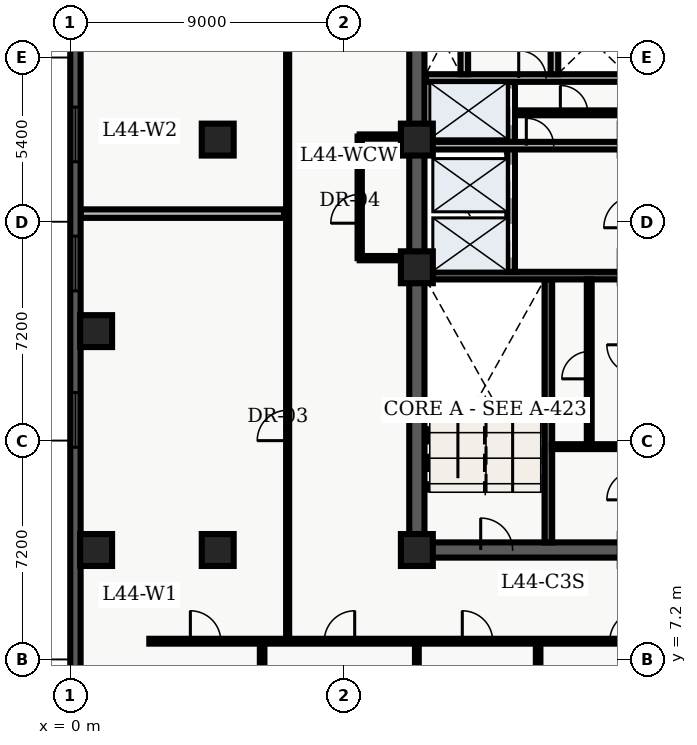
"""IFC4 building model, lengths in metres.
Left out: names, types, materials, properties, quantities, classifications, styles, units other than length and angle.
Written with IfcOpenShell. Run it as: python <this file> out.ifc"""

import sys

from ifc_helpers import new_model, entity, si_unit, converted_unit, direction, frame, origin_with_axes, origin_2d_with_axis, place, context, subcontext, project, spatial, polyline, rectangle, outline, extrude, element, fill, save


model = new_model("IFC4")
c1 = context("Model", 3, precision=1e-05, world=origin_with_axes(), true_north=direction((0.0, 1.0)))
c2 = subcontext(c1, "Body", "Model", "MODEL_VIEW")
j1 = project(units=[si_unit("LENGTHUNIT", "METRE"), converted_unit("PLANEANGLEUNIT", "DEGREE", entity("IfcPlaneAngleMeasure", 0.017), si_unit("PLANEANGLEUNIT", "RADIAN"), dimensions=[0, 0, 0, 0, 0, 0, 0])], contexts=[c1])
p1 = place(None, origin_with_axes())
s1 = spatial("IfcSite", under=j1, at=p1, CompositionType="ELEMENT")
p2 = place(p1, origin_with_axes())
s2 = spatial("IfcBuilding", under=s1, at=p2, CompositionType="ELEMENT")
p3 = place(p2, frame((0.0, 0.0, 179.7), z_axis=(0.0, 0.0, 1.0), x_axis=(1.0, 0.0, 0.0)))
s3 = spatial("IfcBuildingStorey", under=s2, at=p3, CompositionType="ELEMENT", Elevation=179.7)
p4 = place(p3, frame((11.4, 10.8, 0.0), z_axis=(0.0, 0.0, 1.0), x_axis=(0.0, 1.0, 0.0)))
e1 = element("IfcWall", 1, at=p4, inside=s3, PredefinedType="SHEAR", context=c2, shape_type="SweptSolid", body=[
    extrude(outline(polyline([(0.0, -0.25), (27.0, -0.25), (27.0, 0.25), (0.0, 0.25), (0.0, -0.25)])), origin_with_axes(), (0.0, 0.0, 1.0), 3.66),
])
p5 = place(p3, frame((11.4, 10.8, 0.0), z_axis=(0.0, 0.0, 1.0), x_axis=(1.0, 0.0, 0.0)))
e2 = element("IfcWall", 2, at=p5, inside=s3, PredefinedType="SHEAR", context=c2, shape_type="SweptSolid", body=[
    extrude(outline(polyline([(0.0, -0.25), (7.2, -0.25), (7.2, 0.25), (0.0, 0.25), (0.0, -0.25)])), origin_with_axes(), (0.0, 0.0, 1.0), 3.66),
])
p6 = place(p5, frame((2.625, 0.0, 0.0), z_axis=(0.0, 0.0, 1.0), x_axis=(1.0, 0.0, 0.0)))
e3 = element("IfcOpeningElement", 3, at=p6, cuts=e2, PredefinedType="OPENING", context=c2, shape_type="SweptSolid", body=[
    extrude(rectangle(XDim=1.05, YDim=0.52, at=origin_2d_with_axis()), origin_with_axes(), (0.0, 0.0, 1.0), 2.15),
])
p7 = place(p3, frame((15.725, 11.05, 0.0), z_axis=(0.0, 0.0, 1.0), x_axis=(0.0, 1.0, 0.0)))
e4 = element("IfcWall", 4, at=p7, inside=s3, PredefinedType="SHEAR", context=c2, shape_type="SweptSolid", body=[
    extrude(outline(polyline([(0.0, -0.125), (8.65, -0.125), (8.65, 0.125), (0.0, 0.125), (0.0, -0.125)])), origin_with_axes(), (0.0, 0.0, 1.0), 3.66),
])
p8 = place(p3, frame((11.65, 19.825, 0.0), z_axis=(0.0, 0.0, 1.0), x_axis=(1.0, 0.0, 0.0)))
e5 = element("IfcWall", 5, at=p8, inside=s3, PredefinedType="SHEAR", context=c2, shape_type="SweptSolid", body=[
    extrude(outline(polyline([(0.0, -0.125), (6.7, -0.125), (6.7, 0.125), (0.0, 0.125), (0.0, -0.125)])), origin_with_axes(), (0.0, 0.0, 1.0), 3.66),
])
p9 = place(p3, frame((14.5, 19.95, 0.0), z_axis=(0.0, 0.0, 1.0), x_axis=(0.0, 1.0, 0.0)))
e6 = element("IfcWall", 6, at=p9, inside=s3, PredefinedType="SOLIDWALL", context=c2, shape_type="SweptSolid", body=[
    extrude(outline(polyline([(0.0, -0.125), (6.25, -0.125), (6.25, 0.125), (0.0, 0.125), (0.0, -0.125)])), origin_with_axes(), (0.0, 0.0, 1.0), 2.7),
])
p10 = place(p9, frame((1.025, 0.0, 0.0), z_axis=(0.0, 0.0, 1.0), x_axis=(1.0, 0.0, 0.0)))
e7 = element("IfcOpeningElement", 7, at=p10, cuts=e6, PredefinedType="OPENING", context=c2, shape_type="SweptSolid", body=[
    extrude(rectangle(XDim=1.1, YDim=0.27, at=origin_2d_with_axis()), origin_with_axes(), (0.0, 0.0, 1.0), 2.15),
])
p11 = place(p9, frame((2.975, 0.0, 0.0), z_axis=(0.0, 0.0, 1.0), x_axis=(1.0, 0.0, 0.0)))
e8 = element("IfcOpeningElement", 8, at=p11, cuts=e6, PredefinedType="OPENING", context=c2, shape_type="SweptSolid", body=[
    extrude(rectangle(XDim=1.1, YDim=0.27, at=origin_2d_with_axis()), origin_with_axes(), (0.0, 0.0, 1.0), 2.15),
])
p12 = place(p9, frame((5.425, 0.0, 0.0), z_axis=(0.0, 0.0, 1.0), x_axis=(1.0, 0.0, 0.0)))
e9 = element("IfcOpeningElement", 9, at=p12, cuts=e6, PredefinedType="OPENING", context=c2, shape_type="SweptSolid", body=[
    extrude(rectangle(XDim=1.2, YDim=0.27, at=origin_2d_with_axis()), origin_with_axes(), (0.0, 0.0, 1.0), 2.15),
])
p13 = place(p3, frame((11.7, 24.1, 0.0), z_axis=(0.0, 0.0, 1.0), x_axis=(1.0, 0.0, 0.0)))
e10 = element("IfcWall", 10, at=p13, inside=s3, PredefinedType="SOLIDWALL", context=c2, shape_type="SweptSolid", body=[
    extrude(outline(polyline([(0.0, -0.125), (6.6, -0.125), (6.6, 0.125), (0.0, 0.125), (0.0, -0.125)])), origin_with_axes(), (0.0, 0.0, 1.0), 2.7),
])
p14 = place(p13, frame((3.75, 0.0, 0.0), z_axis=(0.0, 0.0, 1.0), x_axis=(1.0, 0.0, 0.0)))
e11 = element("IfcOpeningElement", 11, at=p14, cuts=e10, PredefinedType="OPENING", context=c2, shape_type="SweptSolid", body=[
    extrude(rectangle(XDim=0.9, YDim=0.27, at=origin_2d_with_axis()), origin_with_axes(), (0.0, 0.0, 1.0), 2.15),
])
p15 = place(p3, frame((11.7, 26.325, 0.0), z_axis=(0.0, 0.0, 1.0), x_axis=(1.0, 0.0, 0.0)))
e12 = element("IfcWall", 12, at=p15, inside=s3, PredefinedType="SOLIDWALL", context=c2, shape_type="SweptSolid", body=[
    extrude(outline(polyline([(0.0, -0.125), (6.6, -0.125), (6.6, 0.125), (0.0, 0.125), (0.0, -0.125)])), origin_with_axes(), (0.0, 0.0, 1.0), 2.7),
])
p16 = place(p15, frame((3.5, 0.0, 0.0), z_axis=(0.0, 0.0, 1.0), x_axis=(1.0, 0.0, 0.0)))
e13 = element("IfcOpeningElement", 13, at=p16, cuts=e12, PredefinedType="OPENING", context=c2, shape_type="SweptSolid", body=[
    extrude(rectangle(XDim=0.9, YDim=0.27, at=origin_2d_with_axis()), origin_with_axes(), (0.0, 0.0, 1.0), 2.15),
])
for number, where, z_axis, x_axis in (
    (14, (12.96, 26.45, 0.0), (0.0, 0.0, 1.0), (0.0, 1.0, 0.0)),
    (15, (15.925, 26.45, 0.0), (0.0, 0.0, 1.0), (0.0, 1.0, 0.0)),
):
    element("IfcWall", number, at=place(p3, frame(where, z_axis=z_axis, x_axis=x_axis)), inside=s3, PredefinedType="SOLIDWALL", context=c2, shape_type="SweptSolid", body=[
        extrude(outline(polyline([(0.0, -0.125), (2.2, -0.125), (2.2, 0.125), (0.0, 0.125), (0.0, -0.125)])), origin_with_axes(), (0.0, 0.0, 1.0), 2.7),
    ])
for number, where, z_axis, x_axis in (
    (16, (11.4, 10.8, 0.0), (0.0, 0.0, 1.0), (1.0, 0.0, 0.0)),
    (17, (11.4, 20.1, 0.0), (0.0, 0.0, 1.0), (1.0, 0.0, 0.0)),
    (18, (11.4, 24.3, 0.0), (0.0, 0.0, 1.0), (1.0, 0.0, 0.0)),
    (19, (4.85, 10.8, 0.0), (0.0, 0.0, 1.0), (1.0, 0.0, 0.0)),
    (20, (4.85, 24.3, 0.0), (0.0, 0.0, 1.0), (1.0, 0.0, 0.0)),
    (21, (0.85, 10.8, 0.0), (0.0, 0.0, 1.0), (1.0, 0.0, 0.0)),
    (22, (0.85, 18.0, 0.0), (0.0, 0.0, 1.0), (1.0, 0.0, 0.0)),
):
    element("IfcColumn", number, at=place(p3, frame(where, z_axis=z_axis, x_axis=x_axis)), inside=s3, PredefinedType="COLUMN", context=c2, shape_type="SweptSolid", body=[
        extrude(rectangle(XDim=1.05, YDim=1.05, at=origin_2d_with_axis()), origin_with_axes(), (0.0, 0.0, 1.0), 3.9),
    ])
p17 = place(p3, frame((14.62, 25.18, 0.0), z_axis=(0.0, 0.0, 1.0), x_axis=(1.0, 0.0, 0.0)))
e23 = element("IfcWall", 23, at=p17, inside=s3, PredefinedType="PARTITIONING", context=c2, shape_type="SweptSolid", body=[
    extrude(outline(polyline([(0.0, -0.08), (3.68, -0.08), (3.68, 0.08), (0.0, 0.08), (0.0, -0.08)])), origin_with_axes(), (0.0, 0.0, 1.0), 2.7),
])
p18 = place(p17, frame((1.95, 0.0, 0.0), z_axis=(0.0, 0.0, 1.0), x_axis=(1.0, 0.0, 0.0)))
e24 = element("IfcOpeningElement", 24, at=p18, cuts=e23, PredefinedType="OPENING", context=c2, shape_type="SweptSolid", body=[
    extrude(rectangle(XDim=0.9, YDim=0.18, at=origin_2d_with_axis()), origin_with_axes(), (0.0, 0.0, 1.0), 2.15),
])
p19 = place(p3, frame((15.84, 14.2, 0.0), z_axis=(0.0, 0.0, 1.0), x_axis=(1.0, 0.0, 0.0)))
e25 = element("IfcWall", 25, at=p19, inside=s3, PredefinedType="PARTITIONING", context=c2, shape_type="SweptSolid", body=[
    extrude(outline(polyline([(0.0, -0.08), (2.46, -0.08), (2.46, 0.08), (0.0, 0.08), (0.0, -0.08)])), origin_with_axes(), (0.0, 0.0, 1.0), 2.7),
])
p20 = place(p3, frame((17.07, 14.28, 0.0), z_axis=(0.0, 0.0, 1.0), x_axis=(0.0, 1.0, 0.0)))
e26 = element("IfcWall", 26, at=p20, inside=s3, PredefinedType="PARTITIONING", context=c2, shape_type="SweptSolid", body=[
    extrude(outline(polyline([(0.0, -0.08), (5.42, -0.08), (5.42, 0.08), (0.0, 0.08), (0.0, -0.08)])), origin_with_axes(), (0.0, 0.0, 1.0), 2.7),
])
p21 = place(p20, frame((2.6, 0.0, 0.0), z_axis=(0.0, 0.0, 1.0), x_axis=(1.0, 0.0, 0.0)))
e27 = element("IfcOpeningElement", 27, at=p21, cuts=e26, PredefinedType="OPENING", context=c2, shape_type="SweptSolid", body=[
    extrude(rectangle(XDim=0.9, YDim=0.18, at=origin_2d_with_axis()), origin_with_axes(), (0.0, 0.0, 1.0), 2.15),
])
p22 = place(p3, frame((9.52, 20.4, 0.0), z_axis=(0.0, 0.0, 1.0), x_axis=(0.0, 1.0, 0.0)))
e28 = element("IfcWall", 28, at=p22, inside=s3, PredefinedType="PARTITIONING", context=c2, shape_type="SweptSolid", body=[
    extrude(outline(polyline([(0.0, -0.07), (4.0, -0.07), (4.0, 0.07), (0.0, 0.07), (0.0, -0.07)])), origin_with_axes(), (0.0, 0.0, 1.0), 2.7),
])
p23 = place(p22, frame((1.625, 0.0, 0.0), z_axis=(0.0, 0.0, 1.0), x_axis=(1.0, 0.0, 0.0)))
e29 = element("IfcOpeningElement", 29, at=p23, cuts=e28, PredefinedType="OPENING", context=c2, shape_type="SweptSolid", body=[
    extrude(rectangle(XDim=0.95, YDim=0.16, at=origin_2d_with_axis()), origin_with_axes(), (0.0, 0.0, 1.0), 2.15),
])
for number, where, z_axis, x_axis in (
    (30, (9.52, 20.4, 0.0), (0.0, 0.0, 1.0), (1.0, 0.0, 0.0)),
    (31, (9.52, 24.4, 0.0), (0.0, 0.0, 1.0), (1.0, 0.0, 0.0)),
):
    element("IfcWall", number, at=place(p3, frame(where, z_axis=z_axis, x_axis=x_axis)), inside=s3, PredefinedType="PARTITIONING", context=c2, shape_type="SweptSolid", body=[
        extrude(outline(polyline([(0.0, -0.07), (1.58, -0.07), (1.58, 0.07), (0.0, 0.07), (0.0, -0.07)])), origin_with_axes(), (0.0, 0.0, 1.0), 2.7),
    ])
p24 = place(p3, frame((2.6, 7.8, 0.0), z_axis=(0.0, 0.0, 1.0), x_axis=(1.0, 0.0, 0.0)))
e32 = element("IfcWall", 32, at=p24, inside=s3, PredefinedType="PARTITIONING", context=c2, shape_type="SweptSolid", body=[
    extrude(outline(polyline([(0.0, -0.08), (18.55, -0.08), (18.55, 0.08), (0.0, 0.08), (0.0, -0.08)])), origin_with_axes(), (0.0, 0.0, 1.0), 2.7),
])
p25 = place(p24, frame((1.851, 0.0, 0.0), z_axis=(0.0, 0.0, 1.0), x_axis=(1.0, 0.0, 0.0)))
e33 = element("IfcOpeningElement", 33, at=p25, cuts=e32, PredefinedType="OPENING", context=c2, shape_type="SweptSolid", body=[
    extrude(rectangle(XDim=1.0, YDim=0.18, at=origin_2d_with_axis()), origin_with_axes(), (0.0, 0.0, 1.0), 2.15),
])
p26 = place(p24, frame((6.255, 0.0, 0.0), z_axis=(0.0, 0.0, 1.0), x_axis=(1.0, 0.0, 0.0)))
e34 = element("IfcOpeningElement", 34, at=p26, cuts=e32, PredefinedType="OPENING", context=c2, shape_type="SweptSolid", body=[
    extrude(rectangle(XDim=1.0, YDim=0.18, at=origin_2d_with_axis()), origin_with_axes(), (0.0, 0.0, 1.0), 2.15),
])
p27 = place(p24, frame((10.794, 0.0, 0.0), z_axis=(0.0, 0.0, 1.0), x_axis=(1.0, 0.0, 0.0)))
e35 = element("IfcOpeningElement", 35, at=p27, cuts=e32, PredefinedType="OPENING", context=c2, shape_type="SweptSolid", body=[
    extrude(rectangle(XDim=1.0, YDim=0.18, at=origin_2d_with_axis()), origin_with_axes(), (0.0, 0.0, 1.0), 2.15),
])
p28 = place(p24, frame((15.645, 0.0, 0.0), z_axis=(0.0, 0.0, 1.0), x_axis=(1.0, 0.0, 0.0)))
e36 = element("IfcOpeningElement", 36, at=p28, cuts=e32, PredefinedType="OPENING", context=c2, shape_type="SweptSolid", body=[
    extrude(rectangle(XDim=1.0, YDim=0.18, at=origin_2d_with_axis()), origin_with_axes(), (0.0, 0.0, 1.0), 2.15),
])
p29 = place(p3, frame((7.15, 7.8, 0.0), z_axis=(0.0, 0.0, 1.0), x_axis=(0.0, 1.0, 0.0)))
e37 = element("IfcWall", 37, at=p29, inside=s3, PredefinedType="PARTITIONING", context=c2, shape_type="SweptSolid", body=[
    extrude(outline(polyline([(0.0, -0.05), (32.7, -0.05), (32.7, 0.05), (0.0, 0.05), (0.0, -0.05)])), origin_with_axes(), (0.0, 0.0, 1.0), 2.7),
])
p30 = place(p29, frame((7.098, 0.0, 0.0), z_axis=(0.0, 0.0, 1.0), x_axis=(1.0, 0.0, 0.0)))
e38 = element("IfcOpeningElement", 38, at=p30, cuts=e37, PredefinedType="OPENING", context=c2, shape_type="SweptSolid", body=[
    extrude(rectangle(XDim=1.0, YDim=0.12, at=origin_2d_with_axis()), origin_with_axes(), (0.0, 0.0, 1.0), 2.15),
])
p31 = place(p29, frame((23.317, 0.0, 0.0), z_axis=(0.0, 0.0, 1.0), x_axis=(1.0, 0.0, 0.0)))
e39 = element("IfcOpeningElement", 39, at=p31, cuts=e37, PredefinedType="OPENING", context=c2, shape_type="SweptSolid", body=[
    extrude(rectangle(XDim=1.0, YDim=0.12, at=origin_2d_with_axis()), origin_with_axes(), (0.0, 0.0, 1.0), 2.15),
])
p32 = place(p3, frame((0.335, 21.865, 0.0), z_axis=(0.0, 0.0, 1.0), x_axis=(1.0, 0.0, 0.0)))
e40 = element("IfcWall", 40, at=p32, inside=s3, PredefinedType="PARTITIONING", context=c2, shape_type="SweptSolid", body=[
    extrude(outline(polyline([(0.0, -0.14), (6.695, -0.14), (6.695, 0.14), (0.0, 0.14), (0.0, -0.14)])), origin_with_axes(), (0.0, 0.0, 1.0), 2.7),
])
p33 = place(p3, frame((6.311, 0.335, 0.0), z_axis=(0.0, 0.0, 1.0), x_axis=(0.0, 1.0, 0.0)))
e41 = element("IfcWall", 41, at=p33, inside=s3, PredefinedType="PARTITIONING", context=c2, shape_type="SweptSolid", body=[
    extrude(outline(polyline([(0.0, -0.075), (7.365, -0.075), (7.365, 0.075), (0.0, 0.075), (0.0, -0.075)])), origin_with_axes(), (0.0, 0.0, 1.0), 2.7),
])
p34 = place(p3, frame((11.4, 0.335, 0.0), z_axis=(0.0, 0.0, 1.0), x_axis=(0.0, 1.0, 0.0)))
e42 = element("IfcWall", 42, at=p34, inside=s3, PredefinedType="PARTITIONING", context=c2, shape_type="SweptSolid", body=[
    extrude(outline(polyline([(0.0, -0.062), (7.365, -0.062), (7.365, 0.062), (0.0, 0.062), (0.0, -0.062)])), origin_with_axes(), (0.0, 0.0, 1.0), 2.7),
])
p35 = place(p3, frame((15.389, 0.335, 0.0), z_axis=(0.0, 0.0, 1.0), x_axis=(0.0, 1.0, 0.0)))
e43 = element("IfcWall", 43, at=p35, inside=s3, PredefinedType="PARTITIONING", context=c2, shape_type="SweptSolid", body=[
    extrude(outline(polyline([(0.0, -0.075), (7.365, -0.075), (7.365, 0.075), (0.0, 0.075), (0.0, -0.075)])), origin_with_axes(), (0.0, 0.0, 1.0), 2.7),
])
p36 = place(p3, frame((0.17, 2.74, 0.0), z_axis=(0.0, 0.0, 1.0), x_axis=(0.0, 1.0, 0.0)))
e44 = element("IfcWall", 44, at=p36, inside=s3, PredefinedType="SOLIDWALL", context=c2, shape_type="SweptSolid", body=[
    extrude(outline(polyline([(0.0, -0.17), (43.46, -0.17), (43.46, 0.17), (0.0, 0.17), (0.0, -0.17)])), origin_with_axes(), (0.0, 0.0, 1.0), 3.66),
])
p37 = place(p36, frame((2.948, 0.0, 0.45), z_axis=(0.0, 0.0, 1.0), x_axis=(1.0, 0.0, 0.0)))
e45 = element("IfcOpeningElement", 45, at=p37, cuts=e44, PredefinedType="OPENING", context=c2, shape_type="SweptSolid", body=[
    extrude(rectangle(XDim=1.8, YDim=0.36, at=origin_2d_with_axis()), origin_with_axes(), (0.0, 0.0, 1.0), 2.1),
])
p38 = place(p36, frame((12.339, 0.0, 0.45), z_axis=(0.0, 0.0, 1.0), x_axis=(1.0, 0.0, 0.0)))
e46 = element("IfcOpeningElement", 46, at=p38, cuts=e44, PredefinedType="OPENING", context=c2, shape_type="SweptSolid", body=[
    extrude(rectangle(XDim=1.8, YDim=0.36, at=origin_2d_with_axis()), origin_with_axes(), (0.0, 0.0, 1.0), 2.1),
])
p39 = place(p36, frame((17.484, 0.0, 0.45), z_axis=(0.0, 0.0, 1.0), x_axis=(1.0, 0.0, 0.0)))
e47 = element("IfcOpeningElement", 47, at=p39, cuts=e44, PredefinedType="OPENING", context=c2, shape_type="SweptSolid", body=[
    extrude(rectangle(XDim=1.8, YDim=0.36, at=origin_2d_with_axis()), origin_with_axes(), (0.0, 0.0, 1.0), 2.1),
])
p40 = place(p36, frame((21.73, 0.0, 0.45), z_axis=(0.0, 0.0, 1.0), x_axis=(1.0, 0.0, 0.0)))
e48 = element("IfcOpeningElement", 48, at=p40, cuts=e44, PredefinedType="OPENING", context=c2, shape_type="SweptSolid", body=[
    extrude(rectangle(XDim=1.8, YDim=0.36, at=origin_2d_with_axis()), origin_with_axes(), (0.0, 0.0, 1.0), 2.1),
])
p41 = place(p36, frame((26.426, 0.0, 0.45), z_axis=(0.0, 0.0, 1.0), x_axis=(1.0, 0.0, 0.0)))
e49 = element("IfcOpeningElement", 49, at=p41, cuts=e44, PredefinedType="OPENING", context=c2, shape_type="SweptSolid", body=[
    extrude(rectangle(XDim=1.8, YDim=0.36, at=origin_2d_with_axis()), origin_with_axes(), (0.0, 0.0, 1.0), 2.1),
])
p42 = place(p36, frame((31.121, 0.0, 0.45), z_axis=(0.0, 0.0, 1.0), x_axis=(1.0, 0.0, 0.0)))
e50 = element("IfcOpeningElement", 50, at=p42, cuts=e44, PredefinedType="OPENING", context=c2, shape_type="SweptSolid", body=[
    extrude(rectangle(XDim=1.8, YDim=0.36, at=origin_2d_with_axis()), origin_with_axes(), (0.0, 0.0, 1.0), 2.1),
])
p43 = place(p36, frame((40.062, 0.0, 0.45), z_axis=(0.0, 0.0, 1.0), x_axis=(1.0, 0.0, 0.0)))
e51 = element("IfcOpeningElement", 51, at=p43, cuts=e44, PredefinedType="OPENING", context=c2, shape_type="SweptSolid", body=[
    extrude(rectangle(XDim=1.8, YDim=0.36, at=origin_2d_with_axis()), origin_with_axes(), (0.0, 0.0, 1.0), 2.1),
])
p44 = place(p9, frame((1.025, 0.0, 0.0), z_axis=(0.0, 0.0, 1.0), x_axis=(1.0, 0.0, 0.0)))
e52 = element("IfcDoor", 52, at=p44, inside=s3, OperationType="SLIDING_TO_LEFT", PredefinedType="DOOR", context=c2, shape_type="SweptSolid", body=[
    extrude(rectangle(XDim=1.1, YDim=0.09, at=origin_2d_with_axis()), origin_with_axes(), (0.0, 0.0, 1.0), 2.15),
])
fill(e7, e52)
p45 = place(p9, frame((2.975, 0.0, 0.0), z_axis=(0.0, 0.0, 1.0), x_axis=(1.0, 0.0, 0.0)))
e53 = element("IfcDoor", 53, at=p45, inside=s3, OperationType="SLIDING_TO_RIGHT", PredefinedType="DOOR", context=c2, shape_type="SweptSolid", body=[
    extrude(rectangle(XDim=1.1, YDim=0.09, at=origin_2d_with_axis()), origin_with_axes(), (0.0, 0.0, 1.0), 2.15),
])
fill(e8, e53)
p46 = place(p9, frame((5.425, 0.0, 0.0), z_axis=(0.0, 0.0, 1.0), x_axis=(1.0, 0.0, 0.0)))
e54 = element("IfcDoor", 54, at=p46, inside=s3, OperationType="DOUBLE_DOOR_SLIDING", PredefinedType="DOOR", context=c2, shape_type="SweptSolid", body=[
    extrude(rectangle(XDim=1.2, YDim=0.09, at=origin_2d_with_axis()), origin_with_axes(), (0.0, 0.0, 1.0), 2.15),
])
fill(e9, e54)
p47 = place(p5, frame((2.625, 0.0, 0.0), z_axis=(0.0, 0.0, 1.0), x_axis=(1.0, 0.0, 0.0)))
e55 = element("IfcDoor", 55, at=p47, inside=s3, OperationType="SINGLE_SWING_LEFT", PredefinedType="DOOR", context=c2, shape_type="SweptSolid", body=[
    extrude(rectangle(XDim=1.05, YDim=0.09, at=origin_2d_with_axis()), origin_with_axes(), (0.0, 0.0, 1.0), 2.15),
])
fill(e3, e55)
p48 = place(p15, frame((3.5, 0.0, 0.0), z_axis=(0.0, 0.0, 1.0), x_axis=(1.0, 0.0, 0.0)))
e56 = element("IfcDoor", 56, at=p48, inside=s3, OperationType="SINGLE_SWING_LEFT", PredefinedType="DOOR", context=c2, shape_type="SweptSolid", body=[
    extrude(rectangle(XDim=0.9, YDim=0.09, at=origin_2d_with_axis()), origin_with_axes(), (0.0, 0.0, 1.0), 2.15),
])
fill(e13, e56)
p49 = place(p13, frame((3.75, 0.0, 0.0), z_axis=(0.0, 0.0, 1.0), x_axis=(1.0, 0.0, 0.0)))
e57 = element("IfcDoor", 57, at=p49, inside=s3, OperationType="SINGLE_SWING_LEFT", PredefinedType="DOOR", context=c2, shape_type="SweptSolid", body=[
    extrude(rectangle(XDim=0.9, YDim=0.09, at=origin_2d_with_axis()), origin_with_axes(), (0.0, 0.0, 1.0), 2.15),
])
fill(e11, e57)
p50 = place(p17, frame((1.95, 0.0, 0.0), z_axis=(0.0, 0.0, 1.0), x_axis=(1.0, 0.0, 0.0)))
e58 = element("IfcDoor", 58, at=p50, inside=s3, OperationType="SINGLE_SWING_LEFT", PredefinedType="DOOR", context=c2, shape_type="SweptSolid", body=[
    extrude(rectangle(XDim=0.9, YDim=0.09, at=origin_2d_with_axis()), origin_with_axes(), (0.0, 0.0, 1.0), 2.15),
])
fill(e24, e58)
p51 = place(p20, frame((2.6, 0.0, 0.0), z_axis=(0.0, 0.0, 1.0), x_axis=(1.0, 0.0, 0.0)))
e59 = element("IfcDoor", 59, at=p51, inside=s3, OperationType="SINGLE_SWING_LEFT", PredefinedType="DOOR", context=c2, shape_type="SweptSolid", body=[
    extrude(rectangle(XDim=0.9, YDim=0.09, at=origin_2d_with_axis()), origin_with_axes(), (0.0, 0.0, 1.0), 2.15),
])
fill(e27, e59)
p52 = place(p22, frame((1.625, 0.0, 0.0), z_axis=(0.0, 0.0, 1.0), x_axis=(1.0, 0.0, 0.0)))
e60 = element("IfcDoor", 60, at=p52, inside=s3, OperationType="SINGLE_SWING_LEFT", PredefinedType="DOOR", context=c2, shape_type="SweptSolid", body=[
    extrude(rectangle(XDim=0.95, YDim=0.084, at=origin_2d_with_axis()), origin_with_axes(), (0.0, 0.0, 1.0), 2.15),
])
fill(e29, e60)
p53 = place(p29, frame((7.098, 0.0, 0.0), z_axis=(0.0, 0.0, 1.0), x_axis=(1.0, 0.0, 0.0)))
e61 = element("IfcDoor", 61, at=p53, inside=s3, OperationType="SINGLE_SWING_LEFT", PredefinedType="DOOR", context=c2, shape_type="SweptSolid", body=[
    extrude(rectangle(XDim=1.0, YDim=0.06, at=origin_2d_with_axis()), origin_with_axes(), (0.0, 0.0, 1.0), 2.15),
])
fill(e38, e61)
p54 = place(p24, frame((1.851, 0.0, 0.0), z_axis=(0.0, 0.0, 1.0), x_axis=(1.0, 0.0, 0.0)))
e62 = element("IfcDoor", 62, at=p54, inside=s3, OperationType="SINGLE_SWING_LEFT", PredefinedType="DOOR", context=c2, shape_type="SweptSolid", body=[
    extrude(rectangle(XDim=1.0, YDim=0.09, at=origin_2d_with_axis()), origin_with_axes(), (0.0, 0.0, 1.0), 2.15),
])
fill(e33, e62)
p55 = place(p24, frame((6.255, 0.0, 0.0), z_axis=(0.0, 0.0, 1.0), x_axis=(1.0, 0.0, 0.0)))
e63 = element("IfcDoor", 63, at=p55, inside=s3, OperationType="SINGLE_SWING_RIGHT", PredefinedType="DOOR", context=c2, shape_type="SweptSolid", body=[
    extrude(rectangle(XDim=1.0, YDim=0.09, at=origin_2d_with_axis()), origin_with_axes(), (0.0, 0.0, 1.0), 2.15),
])
fill(e34, e63)
p56 = place(p24, frame((10.794, 0.0, 0.0), z_axis=(0.0, 0.0, 1.0), x_axis=(1.0, 0.0, 0.0)))
e64 = element("IfcDoor", 64, at=p56, inside=s3, OperationType="SINGLE_SWING_LEFT", PredefinedType="DOOR", context=c2, shape_type="SweptSolid", body=[
    extrude(rectangle(XDim=1.0, YDim=0.09, at=origin_2d_with_axis()), origin_with_axes(), (0.0, 0.0, 1.0), 2.15),
])
fill(e35, e64)
p57 = place(p24, frame((15.645, 0.0, 0.0), z_axis=(0.0, 0.0, 1.0), x_axis=(1.0, 0.0, 0.0)))
e65 = element("IfcDoor", 65, at=p57, inside=s3, OperationType="SINGLE_SWING_RIGHT", PredefinedType="DOOR", context=c2, shape_type="SweptSolid", body=[
    extrude(rectangle(XDim=1.0, YDim=0.09, at=origin_2d_with_axis()), origin_with_axes(), (0.0, 0.0, 1.0), 2.15),
])
fill(e36, e65)
p58 = place(p36, frame((12.339, 0.0, 0.45), z_axis=(0.0, 0.0, 1.0), x_axis=(1.0, 0.0, 0.0)))
e66 = element("IfcWindow", 66, at=p58, inside=s3, PredefinedType="WINDOW", context=c2, shape_type="SweptSolid", body=[
    extrude(rectangle(XDim=1.8, YDim=0.09, at=origin_2d_with_axis()), origin_with_axes(), (0.0, 0.0, 1.0), 2.1),
])
fill(e46, e66)
p59 = place(p36, frame((17.484, 0.0, 0.45), z_axis=(0.0, 0.0, 1.0), x_axis=(1.0, 0.0, 0.0)))
e67 = element("IfcWindow", 67, at=p59, inside=s3, PredefinedType="WINDOW", context=c2, shape_type="SweptSolid", body=[
    extrude(rectangle(XDim=1.8, YDim=0.09, at=origin_2d_with_axis()), origin_with_axes(), (0.0, 0.0, 1.0), 2.1),
])
fill(e47, e67)
p60 = place(p36, frame((21.73, 0.0, 0.45), z_axis=(0.0, 0.0, 1.0), x_axis=(1.0, 0.0, 0.0)))
e68 = element("IfcWindow", 68, at=p60, inside=s3, PredefinedType="WINDOW", context=c2, shape_type="SweptSolid", body=[
    extrude(rectangle(XDim=1.8, YDim=0.09, at=origin_2d_with_axis()), origin_with_axes(), (0.0, 0.0, 1.0), 2.1),
])
fill(e48, e68)
save(model, sys.argv[1])
